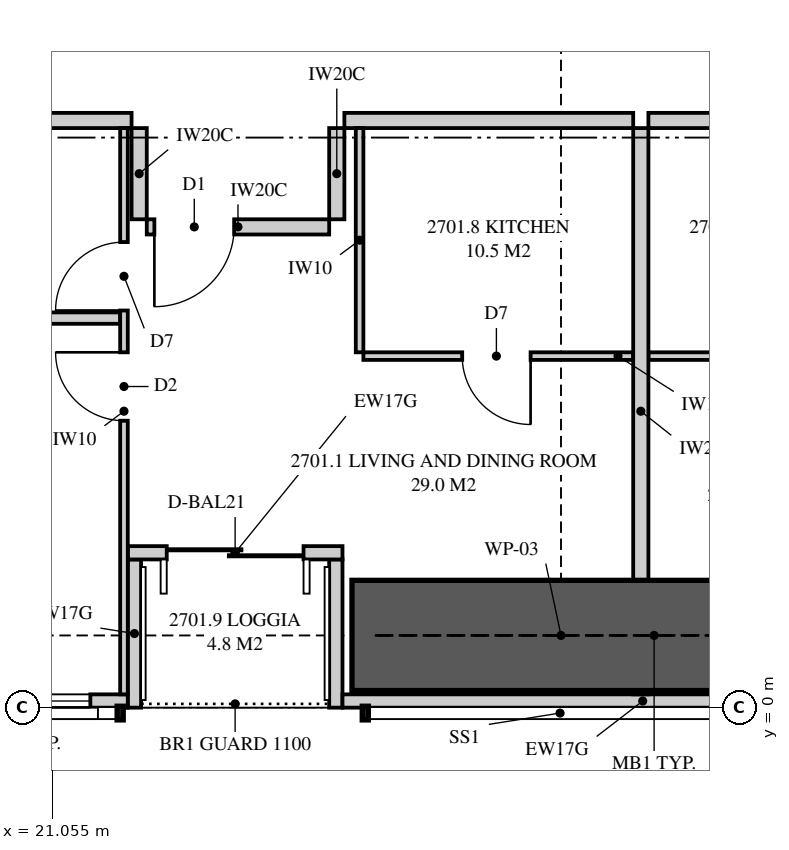
"""IFC4 building model, lengths in metres.
Left out: names, types, materials, properties, quantities, classifications, styles, units other than length and angle.
Written with IfcOpenShell. Run it as: python <this file> out.ifc"""

import sys

from ifc_helpers import new_model, si_unit, direction, frame, frame_2d, origin, place, context, subcontext, project, spatial, polyline, rectangle, outline, extrude, element, fill, save


model = new_model("IFC4")
c1 = context("Model", 3, precision=1e-05, world=origin(), true_north=direction((0.0, 1.0)))
c2 = subcontext(c1, "Body", "Model", "MODEL_VIEW")
j1 = project(units=[si_unit("LENGTHUNIT", "METRE"), si_unit("PLANEANGLEUNIT", "RADIAN")], contexts=[c1])
p1 = place(None, origin())
s1 = spatial("IfcSite", under=j1, at=p1, CompositionType="ELEMENT")
p2 = place(p1, origin())
s2 = spatial("IfcBuilding", under=s1, at=p2, CompositionType="ELEMENT")
p3 = place(p2, frame((0.0, 0.0, 101.5)))
s3 = spatial("IfcBuildingStorey", under=s2, at=p3, CompositionType="ELEMENT", Elevation=101.5)
p4 = place(p3, frame((9.051, 0.087, 0.0), z_axis=(0.0, 0.0, 1.0), x_axis=(1.0, 0.0, 0.0)))
e1 = element("IfcWall", 1, at=p4, inside=s3, PredefinedType="SOLIDWALL", context=c2, shape_type="SweptSolid", body=[
    extrude(outline(polyline([(0.0, 0.0), (12.999, 0.0), (12.999, 2.15), (7.824, 2.15), (7.824, 3.11), (7.666, 3.11), (7.666, 2.15), (7.62, 2.15), (7.62, 3.11), (0.0, 3.11), (0.0, 0.0)])), frame((0.0, 0.087, 0.0), z_axis=(0.0, -1.0, 0.0), x_axis=(1.0, 0.0, 0.0)), (0.0, 0.0, 1.0), 0.175),
])
p5 = place(p4, frame((3.134, 0.0, 0.4)))
e2 = element("IfcOpeningElement", 2, at=p5, cuts=e1, PredefinedType="OPENING", context=c2, shape_type="SweptSolid", body=[
    extrude(rectangle(XDim=1.8, YDim=1.7, at=frame_2d((0.9, 0.85))), frame((0.0, 0.097, 0.0), z_axis=(0.0, -1.0, 0.0), x_axis=(1.0, 0.0, 0.0)), (0.0, 0.0, 1.0), 0.195),
])
p6 = place(p4, frame((10.706, 0.0, 0.4)))
e3 = element("IfcOpeningElement", 3, at=p6, cuts=e1, PredefinedType="OPENING", context=c2, shape_type="SweptSolid", body=[
    extrude(rectangle(XDim=1.8, YDim=1.7, at=frame_2d((0.9, 0.85))), frame((0.0, 0.097, 0.0), z_axis=(0.0, -1.0, 0.0), x_axis=(1.0, 0.0, 0.0)), (0.0, 0.0, 1.0), 0.195),
])
p7 = place(p3, frame((24.875, 0.087, 0.0), z_axis=(0.0, 0.0, 1.0), x_axis=(1.0, 0.0, 0.0)))
e4 = element("IfcWall", 4, at=p7, inside=s3, PredefinedType="SOLIDWALL", context=c2, shape_type="SweptSolid", body=[
    extrude(rectangle(XDim=7.9, YDim=0.175, at=frame_2d((3.95, 0.0))), origin(), (0.0, 0.0, 1.0), 2.15),
])
p8 = place(p7, frame((5.725, 0.0, 0.4)))
e5 = element("IfcOpeningElement", 5, at=p8, cuts=e4, PredefinedType="OPENING", context=c2, shape_type="SweptSolid", body=[
    extrude(rectangle(XDim=1.8, YDim=1.7, at=frame_2d((0.9, 0.85))), frame((0.0, 0.097, 0.0), z_axis=(0.0, -1.0, 0.0), x_axis=(1.0, 0.0, 0.0)), (0.0, 0.0, 1.0), 0.195),
])
p9 = place(p3, frame((22.05, 2.038, 0.0), z_axis=(0.0, 0.0, 1.0), x_axis=(1.0, 0.0, 0.0)))
e6 = element("IfcWall", 6, at=p9, inside=s3, PredefinedType="SOLIDWALL", context=c2, shape_type="SweptSolid", body=[
    extrude(rectangle(XDim=2.825, YDim=0.175, at=frame_2d((1.413, 0.0))), origin(), (0.0, 0.0, 1.0), 3.11),
])
p10 = place(p9, frame((0.512, 0.0, 0.0)))
e7 = element("IfcOpeningElement", 7, at=p10, cuts=e6, PredefinedType="OPENING", context=c2, shape_type="SweptSolid", body=[
    extrude(rectangle(XDim=1.8, YDim=2.1, at=frame_2d((0.9, 1.05))), frame((0.0, 0.097, 0.0), z_axis=(0.0, -1.0, 0.0), x_axis=(1.0, 0.0, 0.0)), (0.0, 0.0, 1.0), 0.195),
])
for number, where, z_axis, x_axis in (
    (8, (22.137, 0.0, 0.0), (0.0, 0.0, 1.0), (0.0, 1.0, 0.0)),
    (9, (24.788, 0.0, 0.0), (0.0, 0.0, 1.0), (0.0, 1.0, 0.0)),
):
    element("IfcWall", number, at=place(p3, frame(where, z_axis=z_axis, x_axis=x_axis)), inside=s3, PredefinedType="SOLIDWALL", context=c2, shape_type="SweptSolid", body=[
        extrude(outline(polyline([(0.0, 0.0), (1.95, 0.0), (1.95, 3.11), (1.75, 3.11), (1.75, 2.15), (0.15, 2.15), (0.15, 3.11), (0.0, 3.11), (0.0, 0.0)])), frame((0.0, 0.087, 0.0), z_axis=(0.0, -1.0, 0.0), x_axis=(1.0, 0.0, 0.0)), (0.0, 0.0, 1.0), 0.175),
    ])
p11 = place(p3, frame((28.8, 0.175, 0.0), z_axis=(0.0, 0.0, 1.0), x_axis=(0.0, 1.0, 0.0)))
e10 = element("IfcWall", 10, at=p11, inside=s3, PredefinedType="PARTITIONING", context=c2, shape_type="SweptSolid", body=[
    extrude(outline(polyline([(0.529, 2.15), (0.0, 2.15), (0.0, 0.0), (0.529, 0.0), (0.529, 0.786), (1.021, 0.786), (1.021, 0.0), (7.45, 0.0), (7.45, 3.11), (1.685, 3.11), (1.685, 2.15), (1.021, 2.15), (1.021, 1.364), (0.529, 1.364), (0.529, 2.15)])), frame((0.0, 0.1, 0.0), z_axis=(0.0, -1.0, 0.0), x_axis=(1.0, 0.0, 0.0)), (0.0, 0.0, 1.0), 0.2),
])
p12 = place(p3, frame((17.775, 7.725, 0.0), z_axis=(0.0, 0.0, 1.0), x_axis=(1.0, 0.0, 0.0)))
e11 = element("IfcWall", 11, at=p12, inside=s3, PredefinedType="PARTITIONING", context=c2, shape_type="SweptSolid", body=[
    extrude(rectangle(XDim=4.325, YDim=0.2, at=frame_2d((2.163, 0.0))), origin(), (0.0, 0.0, 1.0), 3.11),
])
p13 = place(p3, frame((22.0, 0.175, 0.0), z_axis=(0.0, 0.0, 1.0), x_axis=(0.0, 1.0, 0.0)))
e12 = element("IfcWall", 12, at=p13, inside=s3, PredefinedType="PARTITIONING", context=c2, shape_type="SweptSolid", body=[
    extrude(outline(polyline([(0.0, 0.0), (7.45, 0.0), (7.45, 3.11), (1.635, 3.11), (1.635, 2.15), (0.0, 2.15), (0.0, 3.11), (0.0, 0.0)])), frame((0.0, 0.05, 0.0), z_axis=(0.0, -1.0, 0.0), x_axis=(1.0, 0.0, 0.0)), (0.0, 0.0, 1.0), 0.1),
])
p14 = place(p13, frame((3.6, 0.0, 0.0)))
e13 = element("IfcOpeningElement", 13, at=p14, cuts=e12, PredefinedType="OPENING", context=c2, shape_type="SweptSolid", body=[
    extrude(rectangle(XDim=0.9, YDim=2.1, at=frame_2d((0.45, 1.05))), frame((0.0, 0.06, 0.0), z_axis=(0.0, -1.0, 0.0), x_axis=(1.0, 0.0, 0.0)), (0.0, 0.0, 1.0), 0.12),
])
p15 = place(p13, frame((5.05, 0.0, 0.0)))
e14 = element("IfcOpeningElement", 14, at=p15, cuts=e12, PredefinedType="OPENING", context=c2, shape_type="SweptSolid", body=[
    extrude(rectangle(XDim=0.9, YDim=2.1, at=frame_2d((0.45, 1.05))), frame((0.0, 0.06, 0.0), z_axis=(0.0, -1.0, 0.0), x_axis=(1.0, 0.0, 0.0)), (0.0, 0.0, 1.0), 0.12),
])
p16 = place(p3, frame((17.75, 5.125, 0.0), z_axis=(0.0, 0.0, 1.0), x_axis=(1.0, 0.0, 0.0)))
e15 = element("IfcWall", 15, at=p16, inside=s3, PredefinedType="PLUMBINGWALL", context=c2, shape_type="SweptSolid", body=[
    extrude(rectangle(XDim=4.2, YDim=0.15, at=frame_2d((2.1, 0.0))), origin(), (0.0, 0.0, 1.0), 3.11),
])
p17 = place(p3, frame((25.15, 4.625, 0.0), z_axis=(0.0, 0.0, 1.0), x_axis=(1.0, 0.0, 0.0)))
e16 = element("IfcWall", 16, at=p17, inside=s3, PredefinedType="PARTITIONING", context=c2, shape_type="SweptSolid", body=[
    extrude(outline(polyline([(0.0, 0.0), (3.55, 0.0), (3.55, 3.11), (2.887, 3.11), (2.887, 2.541), (2.312, 2.541), (2.312, 3.11), (0.0, 3.11), (0.0, 0.0)])), frame((0.0, 0.05, 0.0), z_axis=(0.0, -1.0, 0.0), x_axis=(1.0, 0.0, 0.0)), (0.0, 0.0, 1.0), 0.1),
])
p18 = place(p17, frame((1.3, 0.0, 0.0)))
e17 = element("IfcOpeningElement", 17, at=p18, cuts=e16, PredefinedType="OPENING", context=c2, shape_type="SweptSolid", body=[
    extrude(rectangle(XDim=0.9, YDim=2.1, at=frame_2d((0.45, 1.05))), frame((0.0, 0.06, 0.0), z_axis=(0.0, -1.0, 0.0), x_axis=(1.0, 0.0, 0.0)), (0.0, 0.0, 1.0), 0.12),
])
p19 = place(p3, frame((25.1, 4.675, 0.0), z_axis=(0.0, 0.0, 1.0), x_axis=(0.0, 1.0, 0.0)))
e18 = element("IfcWall", 18, at=p19, inside=s3, PredefinedType="PARTITIONING", context=c2, shape_type="SweptSolid", body=[
    extrude(rectangle(XDim=2.95, YDim=0.1, at=frame_2d((1.475, 0.0))), origin(), (0.0, 0.0, 1.0), 3.11),
])
p20 = place(p3, frame((28.9, 7.725, 0.0), z_axis=(0.0, 0.0, 1.0), x_axis=(1.0, 0.0, 0.0)))
e19 = element("IfcWall", 19, at=p20, inside=s3, PredefinedType="PARTITIONING", context=c2, shape_type="SweptSolid", body=[
    extrude(rectangle(XDim=7.45, YDim=0.2, at=frame_2d((3.725, 0.0))), origin(), (0.0, 0.0, 1.0), 3.11),
])
p21 = place(p20, frame((3.225, 0.0, 0.0)))
e20 = element("IfcOpeningElement", 20, at=p21, cuts=e19, PredefinedType="OPENING", context=c2, shape_type="SweptSolid", body=[
    extrude(rectangle(XDim=1.05, YDim=2.2, at=frame_2d((0.525, 1.1))), frame((0.0, 0.11, 0.0), z_axis=(0.0, -1.0, 0.0), x_axis=(1.0, 0.0, 0.0)), (0.0, 0.0, 1.0), 0.22),
])
p22 = place(p3, frame((28.9, 4.625, 0.0), z_axis=(0.0, 0.0, 1.0), x_axis=(1.0, 0.0, 0.0)))
e21 = element("IfcWall", 21, at=p22, inside=s3, PredefinedType="PARTITIONING", context=c2, shape_type="SweptSolid", body=[
    extrude(rectangle(XDim=2.95, YDim=0.1, at=frame_2d((1.475, 0.0))), origin(), (0.0, 0.0, 1.0), 3.11),
])
p23 = place(p22, frame((1.05, 0.0, 0.0)))
e22 = element("IfcOpeningElement", 22, at=p23, cuts=e21, PredefinedType="OPENING", context=c2, shape_type="SweptSolid", body=[
    extrude(rectangle(XDim=0.9, YDim=2.1, at=frame_2d((0.45, 1.05))), frame((0.0, 0.06, 0.0), z_axis=(0.0, -1.0, 0.0), x_axis=(1.0, 0.0, 0.0)), (0.0, 0.0, 1.0), 0.12),
])
p24 = place(p3, frame((24.9, 7.725, 0.0), z_axis=(0.0, 0.0, 1.0), x_axis=(1.0, 0.0, 0.0)))
e23 = element("IfcWall", 23, at=p24, inside=s3, PredefinedType="PARTITIONING", context=c2, shape_type="SweptSolid", body=[
    extrude(outline(polyline([(0.0, 0.0), (3.8, 0.0), (3.8, 3.11), (3.187, 3.11), (3.187, 2.541), (2.513, 2.541), (2.513, 3.11), (0.0, 3.11), (0.0, 0.0)])), frame((0.0, 0.1, 0.0), z_axis=(0.0, -1.0, 0.0), x_axis=(1.0, 0.0, 0.0)), (0.0, 0.0, 1.0), 0.2),
])
p25 = place(p3, frame((22.3, 6.325, 0.0), z_axis=(0.0, 0.0, 1.0), x_axis=(1.0, 0.0, 0.0)))
e24 = element("IfcWall", 24, at=p25, inside=s3, PredefinedType="PARTITIONING", context=c2, shape_type="SweptSolid", body=[
    extrude(rectangle(XDim=2.4, YDim=0.2, at=frame_2d((1.2, 0.0))), origin(), (0.0, 0.0, 1.0), 3.11),
])
p26 = place(p25, frame((0.1, 0.0, 0.0)))
e25 = element("IfcOpeningElement", 25, at=p26, cuts=e24, PredefinedType="OPENING", context=c2, shape_type="SweptSolid", body=[
    extrude(rectangle(XDim=1.05, YDim=2.2, at=frame_2d((0.525, 1.1))), frame((0.0, 0.11, 0.0), z_axis=(0.0, -1.0, 0.0), x_axis=(1.0, 0.0, 0.0)), (0.0, 0.0, 1.0), 0.22),
])
for number, where, z_axis, x_axis in (
    (26, (22.2, 7.625, 0.0), (0.0, 0.0, 1.0), (0.0, -1.0, 0.0)),
    (27, (24.8, 7.625, 0.0), (0.0, 0.0, 1.0), (0.0, -1.0, 0.0)),
):
    element("IfcWall", number, at=place(p3, frame(where, z_axis=z_axis, x_axis=x_axis)), inside=s3, PredefinedType="PARTITIONING", context=c2, shape_type="SweptSolid", body=[
        extrude(rectangle(XDim=1.2, YDim=0.2, at=frame_2d((0.6, 0.0))), origin(), (0.0, 0.0, 1.0), 3.11),
    ])
p27 = place(p3, frame((25.0, 0.95, 0.0), z_axis=(0.0, 0.0, 1.0), x_axis=(1.0, 0.0, 0.0)))
e28 = element("IfcWall", 28, at=p27, inside=s3, PredefinedType="SHEAR", context=c2, shape_type="SweptSolid", body=[
    extrude(rectangle(XDim=5.5, YDim=1.45, at=frame_2d((2.75, 0.0))), origin(), (0.0, 0.0, 1.0), 3.35),
])
p28 = place(p6, origin())
e29 = element("IfcWindow", 29, at=p28, inside=s3, PartitioningType="SINGLE_PANEL", PredefinedType="WINDOW", context=c2, shape_type="SweptSolid", body=[
    extrude(rectangle(XDim=1.8, YDim=1.7, at=frame_2d((0.9, 0.85))), frame((0.0, 0.03, 0.0), z_axis=(0.0, -1.0, 0.0), x_axis=(1.0, 0.0, 0.0)), (0.0, 0.0, 1.0), 0.06),
])
fill(e3, e29)
p29 = place(p10, origin())
e30 = element("IfcDoor", 30, at=p29, inside=s3, OperationType="SLIDING_TO_LEFT", PredefinedType="DOOR", context=c2, shape_type="SweptSolid", body=[
    extrude(rectangle(XDim=1.8, YDim=2.1, at=frame_2d((0.9, 1.05))), frame((0.0, 0.025, 0.0), z_axis=(0.0, -1.0, 0.0), x_axis=(1.0, 0.0, 0.0)), (0.0, 0.0, 1.0), 0.05),
])
fill(e7, e30)
p30 = place(p26, frame((1.05, 0.0, 0.0), z_axis=(0.0, 0.0, 1.0), x_axis=(-1.0, 0.0, 0.0)))
e31 = element("IfcDoor", 31, at=p30, inside=s3, OperationType="SINGLE_SWING_RIGHT", PredefinedType="DOOR", context=c2, shape_type="SweptSolid", body=[
    extrude(rectangle(XDim=1.05, YDim=2.2, at=frame_2d((0.525, 1.1))), frame((0.0, 0.025, 0.0), z_axis=(0.0, -1.0, 0.0), x_axis=(1.0, 0.0, 0.0)), (0.0, 0.0, 1.0), 0.05),
])
fill(e25, e31)
p31 = place(p14, origin())
e32 = element("IfcDoor", 32, at=p31, inside=s3, OperationType="SINGLE_SWING_RIGHT", PredefinedType="DOOR", context=c2, shape_type="SweptSolid", body=[
    extrude(rectangle(XDim=0.9, YDim=2.1, at=frame_2d((0.45, 1.05))), frame((0.0, 0.025, 0.0), z_axis=(0.0, -1.0, 0.0), x_axis=(1.0, 0.0, 0.0)), (0.0, 0.0, 1.0), 0.05),
])
fill(e13, e32)
p32 = place(p15, origin())
e33 = element("IfcDoor", 33, at=p32, inside=s3, OperationType="SINGLE_SWING_LEFT", PredefinedType="DOOR", context=c2, shape_type="SweptSolid", body=[
    extrude(rectangle(XDim=0.9, YDim=2.1, at=frame_2d((0.45, 1.05))), frame((0.0, 0.025, 0.0), z_axis=(0.0, -1.0, 0.0), x_axis=(1.0, 0.0, 0.0)), (0.0, 0.0, 1.0), 0.05),
])
fill(e14, e33)
p33 = place(p18, frame((0.9, 0.0, 0.0), z_axis=(0.0, 0.0, 1.0), x_axis=(-1.0, 0.0, 0.0)))
e34 = element("IfcDoor", 34, at=p33, inside=s3, OperationType="SINGLE_SWING_LEFT", PredefinedType="DOOR", context=c2, shape_type="SweptSolid", body=[
    extrude(rectangle(XDim=0.9, YDim=2.1, at=frame_2d((0.45, 1.05))), frame((0.0, 0.025, 0.0), z_axis=(0.0, -1.0, 0.0), x_axis=(1.0, 0.0, 0.0)), (0.0, 0.0, 1.0), 0.05),
])
fill(e17, e34)
save(model, sys.argv[1])
